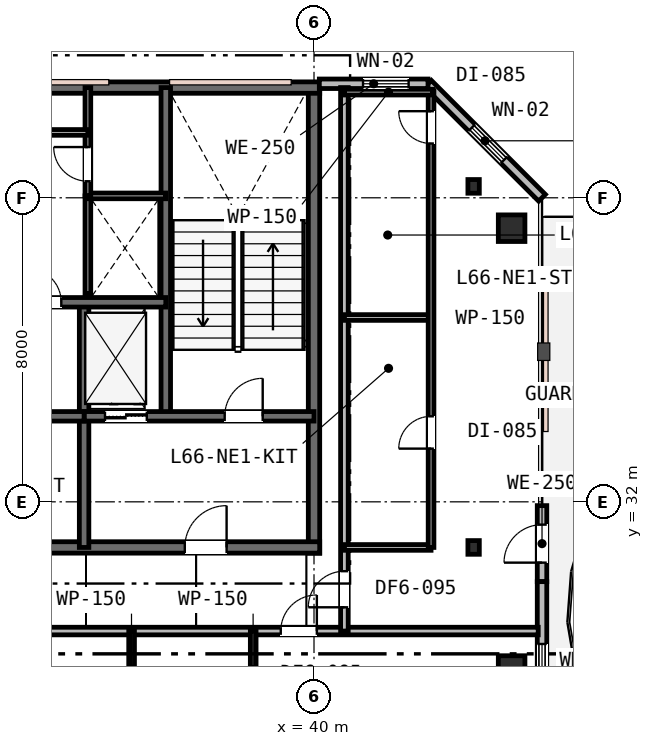
"""IFC4 building model, lengths in metres.
Left out: names, types, materials, properties, quantities, classifications, styles, units other than length and angle.
Written with IfcOpenShell. Run it as: python <this file> out.ifc"""

import sys

from ifc_helpers import new_model, si_unit, direction, frame, frame_2d, origin, origin_2d, place, context, subcontext, project, spatial, rectangle, i_section, extrude, element, fill, save


model = new_model("IFC4")
c1 = context("Model", 3, precision=1e-05, world=origin(), true_north=direction((0.0, 1.0)))
c2 = subcontext(c1, "Body", "Model", "MODEL_VIEW")
j1 = project(units=[si_unit("LENGTHUNIT", "METRE"), si_unit("PLANEANGLEUNIT", "RADIAN")], contexts=[c1])
p1 = place(None, origin())
s1 = spatial("IfcSite", under=j1, at=p1, CompositionType="ELEMENT")
p2 = place(p1, origin())
s2 = spatial("IfcBuilding", under=s1, at=p2, CompositionType="ELEMENT")
p3 = place(p2, frame((0.0, 0.0, 256.4)))
s3 = spatial("IfcBuildingStorey", under=s2, at=p3, CompositionType="ELEMENT", Elevation=256.4)
p4 = place(p3, frame((40.0, 30.65, 0.0), z_axis=(0.0, 0.0, 1.0), x_axis=(0.0, 1.0, 0.0)))
e1 = element("IfcWall", 1, at=p4, inside=s3, PredefinedType="SHEAR", context=c2, shape_type="SweptSolid", body=[
    extrude(rectangle(XDim=12.3, YDim=0.3, at=frame_2d((6.15, 0.0))), origin(), (0.0, 0.0, 1.0), 3.8),
])
p5 = place(p3, frame((15.85, 42.9, 0.0), z_axis=(0.0, 0.0, 1.0), x_axis=(1.0, 0.0, 0.0)))
e2 = element("IfcWall", 2, at=p5, inside=s3, PredefinedType="SHEAR", context=c2, shape_type="SweptSolid", body=[
    extrude(rectangle(XDim=24.3, YDim=0.3, at=frame_2d((12.15, 0.0))), origin(), (0.0, 0.0, 1.0), 3.8),
])
p6 = place(p3, frame((28.95, 30.8, 0.0), z_axis=(0.0, 0.0, 1.0), x_axis=(1.0, 0.0, 0.0)))
e3 = element("IfcWall", 3, at=p6, inside=s3, PredefinedType="SHEAR", context=c2, shape_type="SweptSolid", body=[
    extrude(rectangle(XDim=11.2, YDim=0.3, at=frame_2d((5.6, 0.0))), origin(), (0.0, 0.0, 1.0), 3.8),
])
p7 = place(p6, frame((7.65, 0.0, 0.0)))
e4 = element("IfcOpeningElement", 4, at=p7, cuts=e3, PredefinedType="OPENING", context=c2, shape_type="SweptSolid", body=[
    extrude(rectangle(XDim=1.1, YDim=2.15, at=frame_2d((0.55, 1.075))), frame((0.0, 0.16, 0.0), z_axis=(0.0, -1.0, 0.0), x_axis=(1.0, 0.0, 0.0)), (0.0, 0.0, 1.0), 0.32),
])
p8 = place(p3, frame((36.1, 34.25, 0.0), z_axis=(0.0, 0.0, 1.0), x_axis=(0.0, 1.0, 0.0)))
e5 = element("IfcWall", 5, at=p8, inside=s3, PredefinedType="SHEAR", context=c2, shape_type="SweptSolid", body=[
    extrude(rectangle(XDim=8.65, YDim=0.25, at=frame_2d((4.325, 0.0))), origin(), (0.0, 0.0, 1.0), 3.8),
])
p9 = place(p3, frame((33.95, 30.8, 0.0), z_axis=(0.0, 0.0, 1.0), x_axis=(0.0, 1.0, 0.0)))
e6 = element("IfcWall", 6, at=p9, inside=s3, PredefinedType="SHEAR", context=c2, shape_type="SweptSolid", body=[
    extrude(rectangle(XDim=6.45, YDim=0.25, at=frame_2d((3.225, 0.0))), origin(), (0.0, 0.0, 1.0), 3.8),
])
p10 = place(p3, frame((33.95, 34.25, 0.0), z_axis=(0.0, 0.0, 1.0), x_axis=(1.0, 0.0, 0.0)))
e7 = element("IfcWall", 7, at=p10, inside=s3, PredefinedType="SHEAR", context=c2, shape_type="SweptSolid", body=[
    extrude(rectangle(XDim=6.05, YDim=0.25, at=frame_2d((3.025, 0.0))), origin(), (0.0, 0.0, 1.0), 3.8),
])
p11 = place(p10, frame((3.7, 0.0, 0.0)))
e8 = element("IfcOpeningElement", 8, at=p11, cuts=e7, PredefinedType="OPENING", context=c2, shape_type="SweptSolid", body=[
    extrude(rectangle(XDim=1.0, YDim=2.15, at=frame_2d((0.5, 1.075))), frame((0.0, 0.135, 0.0), z_axis=(0.0, -1.0, 0.0), x_axis=(1.0, 0.0, 0.0)), (0.0, 0.0, 1.0), 0.27),
])
p12 = place(p10, frame((0.55, 0.0, 0.0)))
e9 = element("IfcOpeningElement", 9, at=p12, cuts=e7, PredefinedType="OPENING", context=c2, shape_type="SweptSolid", body=[
    extrude(rectangle(XDim=1.1, YDim=2.15, at=frame_2d((0.55, 1.075))), frame((0.0, 0.135, 0.0), z_axis=(0.0, -1.0, 0.0), x_axis=(1.0, 0.0, 0.0)), (0.0, 0.0, 1.0), 0.27),
])
p13 = place(p3, frame((28.95, 34.25, 0.0), z_axis=(0.0, 0.0, 1.0), x_axis=(1.0, 0.0, 0.0)))
e10 = element("IfcWall", 10, at=p13, inside=s3, PredefinedType="SHEAR", context=c2, shape_type="SweptSolid", body=[
    extrude(rectangle(XDim=5.0, YDim=0.25, at=frame_2d((2.5, 0.0))), origin(), (0.0, 0.0, 1.0), 3.8),
])
p14 = place(p13, frame((1.95, 0.0, 0.0)))
e11 = element("IfcOpeningElement", 11, at=p14, cuts=e10, PredefinedType="OPENING", context=c2, shape_type="SweptSolid", body=[
    extrude(rectangle(XDim=1.0, YDim=2.15, at=frame_2d((0.5, 1.075))), frame((0.0, 0.135, 0.0), z_axis=(0.0, -1.0, 0.0), x_axis=(1.0, 0.0, 0.0)), (0.0, 0.0, 1.0), 0.27),
])
p15 = place(p3, frame((19.9, 37.25, 0.0), z_axis=(0.0, 0.0, 1.0), x_axis=(1.0, 0.0, 0.0)))
e12 = element("IfcWall", 12, at=p15, inside=s3, PredefinedType="SHEAR", context=c2, shape_type="SweptSolid", body=[
    extrude(rectangle(XDim=16.2, YDim=0.25, at=frame_2d((8.1, 0.0))), origin(), (0.0, 0.0, 1.0), 3.8),
])
p16 = place(p15, frame((12.55, 0.0, 0.0)))
e13 = element("IfcOpeningElement", 13, at=p16, cuts=e12, PredefinedType="OPENING", context=c2, shape_type="SweptSolid", body=[
    extrude(rectangle(XDim=0.9, YDim=2.15, at=frame_2d((0.45, 1.075))), frame((0.0, 0.135, 0.0), z_axis=(0.0, -1.0, 0.0), x_axis=(1.0, 0.0, 0.0)), (0.0, 0.0, 1.0), 0.27),
])
p17 = place(p15, frame((2.5, 0.0, 0.0)))
e14 = element("IfcOpeningElement", 14, at=p17, cuts=e12, PredefinedType="OPENING", context=c2, shape_type="SweptSolid", body=[
    extrude(rectangle(XDim=1.05, YDim=2.15, at=frame_2d((0.525, 1.075))), frame((0.0, 0.135, 0.0), z_axis=(0.0, -1.0, 0.0), x_axis=(1.0, 0.0, 0.0)), (0.0, 0.0, 1.0), 0.27),
])
p18 = place(p15, frame((4.4, 0.0, 0.0)))
e15 = element("IfcOpeningElement", 15, at=p18, cuts=e12, PredefinedType="OPENING", context=c2, shape_type="SweptSolid", body=[
    extrude(rectangle(XDim=1.05, YDim=2.15, at=frame_2d((0.525, 1.075))), frame((0.0, 0.135, 0.0), z_axis=(0.0, -1.0, 0.0), x_axis=(1.0, 0.0, 0.0)), (0.0, 0.0, 1.0), 0.27),
])
p19 = place(p15, frame((6.3, 0.0, 0.0)))
e16 = element("IfcOpeningElement", 16, at=p19, cuts=e12, PredefinedType="OPENING", context=c2, shape_type="SweptSolid", body=[
    extrude(rectangle(XDim=1.05, YDim=2.15, at=frame_2d((0.525, 1.075))), frame((0.0, 0.135, 0.0), z_axis=(0.0, -1.0, 0.0), x_axis=(1.0, 0.0, 0.0)), (0.0, 0.0, 1.0), 0.27),
])
for number, where, z_axis, x_axis in (
    (17, (45.2, 27.6, 0.0), (0.0, 0.0, 1.0), (1.0, 0.0, 0.0)),
    (18, (45.2, 39.2, 0.0), (0.0, 0.0, 1.0), (1.0, 0.0, 0.0)),
):
    element("IfcColumn", number, at=place(p3, frame(where, z_axis=z_axis, x_axis=x_axis)), inside=s3, PredefinedType="COLUMN", context=c2, shape_type="SweptSolid", body=[
        extrude(rectangle(XDim=0.7, YDim=0.7, at=origin_2d()), origin(), (0.0, 0.0, 1.0), 3.8),
    ])
for number, where, z_axis, x_axis in (
    (19, (44.2, 30.8, 0.0), (0.0, 0.0, 1.0), (1.0, 0.0, 0.0)),
    (20, (44.2, 40.3, 0.0), (0.0, 0.0, 1.0), (1.0, 0.0, 0.0)),
):
    element("IfcColumn", number, at=place(p3, frame(where, z_axis=z_axis, x_axis=x_axis)), inside=s3, PredefinedType="COLUMN", context=c2, shape_type="SweptSolid", body=[
        extrude(i_section(OverallWidth=0.3, OverallDepth=0.36, WebThickness=0.013, FlangeThickness=0.022, FilletRadius=0.027, at=origin_2d()), origin(), (0.0, 0.0, 1.0), 3.8),
    ])
p20 = place(p3, frame((46.0, 29.9, 0.0), z_axis=(0.0, 0.0, 1.0), x_axis=(0.0, 1.0, 0.0)))
e21 = element("IfcWall", 21, at=p20, inside=s3, PredefinedType="STANDARD", context=c2, shape_type="SweptSolid", body=[
    extrude(rectangle(XDim=2.0, YDim=0.25, at=frame_2d((1.0, 0.0))), origin(), (0.0, 0.0, 1.0), 3.53),
])
p21 = place(p20, frame((0.5, 0.0, 0.0)))
e22 = element("IfcOpeningElement", 22, at=p21, cuts=e21, PredefinedType="OPENING", context=c2, shape_type="SweptSolid", body=[
    extrude(rectangle(XDim=1.0, YDim=2.15, at=frame_2d((0.5, 1.075))), frame((0.0, 0.135, 0.0), z_axis=(0.0, -1.0, 0.0), x_axis=(1.0, 0.0, 0.0)), (0.0, 0.0, 1.0), 0.27),
])
p22 = place(p3, frame((46.0, 27.0, 0.0), z_axis=(0.0, 0.0, 1.0), x_axis=(0.0, 1.0, 0.0)))
e23 = element("IfcWall", 23, at=p22, inside=s3, PredefinedType="STANDARD", context=c2, shape_type="SweptSolid", body=[
    extrude(rectangle(XDim=2.9, YDim=0.25, at=frame_2d((1.45, 0.0))), origin(), (0.0, 0.0, 1.0), 3.53),
])
p23 = place(p22, frame((0.36, 0.0, 0.9)))
e24 = element("IfcOpeningElement", 24, at=p23, cuts=e23, PredefinedType="OPENING", context=c2, shape_type="SweptSolid", body=[
    extrude(rectangle(XDim=0.9, YDim=1.55, at=frame_2d((0.45, 0.775))), frame((0.0, 0.135, 0.0), z_axis=(0.0, -1.0, 0.0), x_axis=(1.0, 0.0, 0.0)), (0.0, 0.0, 1.0), 0.27),
])
p24 = place(p3, frame((46.0, 40.0, 0.0), z_axis=(0.0, 0.0, 1.0), x_axis=(-0.707106781187, 0.707106781187, 0.0)))
e25 = element("IfcWall", 25, at=p24, inside=s3, PredefinedType="STANDARD", context=c2, shape_type="SweptSolid", body=[
    extrude(rectangle(XDim=4.243, YDim=0.25, at=frame_2d((2.121, 0.0))), origin(), (0.0, 0.0, 1.0), 3.53),
])
p25 = place(p24, frame((1.411, 0.0, 0.85)))
e26 = element("IfcOpeningElement", 26, at=p25, cuts=e25, PredefinedType="OPENING", context=c2, shape_type="SweptSolid", body=[
    extrude(rectangle(XDim=1.2, YDim=1.6, at=frame_2d((0.6, 0.8))), frame((0.0, 0.135, 0.0), z_axis=(0.0, -1.0, 0.0), x_axis=(1.0, 0.0, 0.0)), (0.0, 0.0, 1.0), 0.27),
])
p26 = place(p3, frame((43.0, 43.0, 0.0), z_axis=(0.0, 0.0, 1.0), x_axis=(-1.0, 0.0, 0.0)))
e27 = element("IfcWall", 27, at=p26, inside=s3, PredefinedType="STANDARD", context=c2, shape_type="SweptSolid", body=[
    extrude(rectangle(XDim=2.86, YDim=0.25, at=frame_2d((1.43, 0.0))), origin(), (0.0, 0.0, 1.0), 3.53),
])
p27 = place(p26, frame((0.51, 0.0, 0.85)))
e28 = element("IfcOpeningElement", 28, at=p27, cuts=e27, PredefinedType="OPENING", context=c2, shape_type="SweptSolid", body=[
    extrude(rectangle(XDim=1.2, YDim=1.6, at=frame_2d((0.6, 0.8))), frame((0.0, 0.135, 0.0), z_axis=(0.0, -1.0, 0.0), x_axis=(1.0, 0.0, 0.0)), (0.0, 0.0, 1.0), 0.27),
])
p28 = place(p3, frame((34.05, 37.473, 0.0), z_axis=(0.0, 0.0, 1.0), x_axis=(0.0, 1.0, 0.0)))
e29 = element("IfcWall", 29, at=p28, inside=s3, PredefinedType="PLUMBINGWALL", context=c2, shape_type="SweptSolid", body=[
    extrude(rectangle(XDim=2.577, YDim=0.15, at=frame_2d((1.288, 0.0))), origin(), (0.0, 0.0, 1.0), 3.53),
])
p29 = place(p3, frame((34.05, 40.05, 0.0), z_axis=(0.0, 0.0, 1.0), x_axis=(1.0, 0.0, 0.0)))
e30 = element("IfcWall", 30, at=p29, inside=s3, PredefinedType="PARTITIONING", context=c2, shape_type="SweptSolid", body=[
    extrude(rectangle(XDim=2.05, YDim=0.15, at=frame_2d((1.025, 0.0))), origin(), (0.0, 0.0, 1.0), 3.53),
])
p30 = place(p3, frame((34.05, 40.05, 0.0), z_axis=(0.0, 0.0, 1.0), x_axis=(0.0, 1.0, 0.0)))
e31 = element("IfcWall", 31, at=p30, inside=s3, PredefinedType="PARTITIONING", context=c2, shape_type="SweptSolid", body=[
    extrude(rectangle(XDim=2.85, YDim=0.15, at=frame_2d((1.425, 0.0))), origin(), (0.0, 0.0, 1.0), 3.53),
])
p31 = place(p30, frame((0.385, 0.0, 0.0)))
e32 = element("IfcOpeningElement", 32, at=p31, cuts=e31, PredefinedType="OPENING", context=c2, shape_type="SweptSolid", body=[
    extrude(rectangle(XDim=0.9, YDim=2.15, at=frame_2d((0.45, 1.075))), frame((0.0, 0.085, 0.0), z_axis=(0.0, -1.0, 0.0), x_axis=(1.0, 0.0, 0.0)), (0.0, 0.0, 1.0), 0.17),
])
p32 = place(p3, frame((22.08, 41.72, 0.0), z_axis=(0.0, 0.0, 1.0), x_axis=(1.0, 0.0, 0.0)))
e33 = element("IfcWall", 33, at=p32, inside=s3, PredefinedType="PARTITIONING", context=c2, shape_type="SweptSolid", body=[
    extrude(rectangle(XDim=11.97, YDim=0.15, at=frame_2d((5.985, 0.0))), origin(), (0.0, 0.0, 1.0), 3.53),
])
p33 = place(p32, frame((5.535, 0.0, 0.0)))
e34 = element("IfcOpeningElement", 34, at=p33, cuts=e33, PredefinedType="OPENING", context=c2, shape_type="SweptSolid", body=[
    extrude(rectangle(XDim=0.9, YDim=2.15, at=frame_2d((0.45, 1.075))), frame((0.0, 0.085, 0.0), z_axis=(0.0, -1.0, 0.0), x_axis=(1.0, 0.0, 0.0)), (0.0, 0.0, 1.0), 0.17),
])
p34 = place(p3, frame((21.6, 28.6, 0.0), z_axis=(0.0, 0.0, 1.0), x_axis=(1.0, 0.0, 0.0)))
e35 = element("IfcWall", 35, at=p34, inside=s3, PredefinedType="PARTITIONING", context=c2, shape_type="SweptSolid", body=[
    extrude(rectangle(XDim=24.3, YDim=0.2, at=frame_2d((12.15, 0.0))), origin(), (0.0, 0.0, 1.0), 3.16),
])
p35 = place(p34, frame((5.925, 0.0, 0.0)))
e36 = element("IfcOpeningElement", 36, at=p35, cuts=e35, PredefinedType="OPENING", context=c2, shape_type="SweptSolid", body=[
    extrude(rectangle(XDim=0.95, YDim=2.15, at=frame_2d((0.475, 1.075))), frame((0.0, 0.11, 0.0), z_axis=(0.0, -1.0, 0.0), x_axis=(1.0, 0.0, 0.0)), (0.0, 0.0, 1.0), 0.22),
])
p36 = place(p34, frame((17.525, 0.0, 0.0)))
e37 = element("IfcOpeningElement", 37, at=p36, cuts=e35, PredefinedType="OPENING", context=c2, shape_type="SweptSolid", body=[
    extrude(rectangle(XDim=0.95, YDim=2.15, at=frame_2d((0.475, 1.075))), frame((0.0, 0.11, 0.0), z_axis=(0.0, -1.0, 0.0), x_axis=(1.0, 0.0, 0.0)), (0.0, 0.0, 1.0), 0.22),
])
p37 = place(p3, frame((40.8, 28.6, 0.0), z_axis=(0.0, 0.0, 1.0), x_axis=(0.0, 1.0, 0.0)))
e38 = element("IfcWall", 38, at=p37, inside=s3, PredefinedType="PARTITIONING", context=c2, shape_type="SweptSolid", body=[
    extrude(rectangle(XDim=14.3, YDim=0.2, at=frame_2d((7.15, 0.0))), origin(), (0.0, 0.0, 1.0), 3.16),
])
p38 = place(p37, frame((0.625, 0.0, 0.0)))
e39 = element("IfcOpeningElement", 39, at=p38, cuts=e38, PredefinedType="OPENING", context=c2, shape_type="SweptSolid", body=[
    extrude(rectangle(XDim=0.95, YDim=2.15, at=frame_2d((0.475, 1.075))), frame((0.0, 0.11, 0.0), z_axis=(0.0, -1.0, 0.0), x_axis=(1.0, 0.0, 0.0)), (0.0, 0.0, 1.0), 0.22),
])
p39 = place(p3, frame((40.8, 30.8, 0.0), z_axis=(0.0, 0.0, 1.0), x_axis=(1.0, 0.0, 0.0)))
e40 = element("IfcWall", 40, at=p39, inside=s3, PredefinedType="PARTITIONING", context=c2, shape_type="SweptSolid", body=[
    extrude(rectangle(XDim=2.28, YDim=0.15, at=frame_2d((1.14, 0.0))), origin(), (0.0, 0.0, 1.0), 3.16),
])
p40 = place(p3, frame((40.8, 36.85, 0.0), z_axis=(0.0, 0.0, 1.0), x_axis=(1.0, 0.0, 0.0)))
e41 = element("IfcWall", 41, at=p40, inside=s3, PredefinedType="PARTITIONING", context=c2, shape_type="SweptSolid", body=[
    extrude(rectangle(XDim=2.28, YDim=0.15, at=frame_2d((1.14, 0.0))), origin(), (0.0, 0.0, 1.0), 3.53),
])
p41 = place(p3, frame((43.08, 30.8, 0.0), z_axis=(0.0, 0.0, 1.0), x_axis=(0.0, 1.0, 0.0)))
e42 = element("IfcWall", 42, at=p41, inside=s3, PredefinedType="PARTITIONING", context=c2, shape_type="SweptSolid", body=[
    extrude(rectangle(XDim=12.02, YDim=0.15, at=frame_2d((6.01, 0.0))), origin(), (0.0, 0.0, 1.0), 3.16),
])
p42 = place(p41, frame((2.6, 0.0, 0.0)))
e43 = element("IfcOpeningElement", 43, at=p42, cuts=e42, PredefinedType="OPENING", context=c2, shape_type="SweptSolid", body=[
    extrude(rectangle(XDim=0.85, YDim=2.15, at=frame_2d((0.425, 1.075))), frame((0.0, 0.085, 0.0), z_axis=(0.0, -1.0, 0.0), x_axis=(1.0, 0.0, 0.0)), (0.0, 0.0, 1.0), 0.17),
])
p43 = place(p41, frame((10.629, 0.0, 0.0)))
e44 = element("IfcOpeningElement", 44, at=p43, cuts=e42, PredefinedType="OPENING", context=c2, shape_type="SweptSolid", body=[
    extrude(rectangle(XDim=0.85, YDim=2.15, at=frame_2d((0.425, 1.075))), frame((0.0, 0.085, 0.0), z_axis=(0.0, -1.0, 0.0), x_axis=(1.0, 0.0, 0.0)), (0.0, 0.0, 1.0), 0.17),
])
p44 = place(p3, frame((40.8, 42.78, 0.0), z_axis=(0.0, 0.0, 1.0), x_axis=(1.0, 0.0, 0.0)))
e45 = element("IfcWall", 45, at=p44, inside=s3, PredefinedType="PARTITIONING", context=c2, shape_type="SweptSolid", body=[
    extrude(rectangle(XDim=2.32, YDim=0.15, at=frame_2d((1.16, 0.0))), origin(), (0.0, 0.0, 1.0), 3.53),
])
for number, where, z_axis, x_axis in (
    (46, (38.4, 26.576, 0.0), (0.0, 0.0, 1.0), (0.0, 1.0, 0.0)),
    (47, (35.2, 26.576, 0.0), (0.0, 0.0, 1.0), (0.0, 1.0, 0.0)),
):
    element("IfcWall", number, at=place(p3, frame(where, z_axis=z_axis, x_axis=x_axis)), inside=s3, PredefinedType="PARTITIONING", context=c2, shape_type="SweptSolid", body=[
        extrude(rectangle(XDim=2.024, YDim=0.15, at=frame_2d((1.012, 0.0))), origin(), (0.0, 0.0, 1.0), 3.53),
    ])
p45 = place(p21, origin())
e48 = element("IfcDoor", 48, at=p45, inside=s3, OperationType="SINGLE_SWING_LEFT", PredefinedType="DOOR", context=c2, shape_type="SweptSolid", body=[
    extrude(rectangle(XDim=1.0, YDim=2.15, at=frame_2d((0.5, 1.075))), frame((0.0, 0.025, 0.0), z_axis=(0.0, -1.0, 0.0), x_axis=(1.0, 0.0, 0.0)), (0.0, 0.0, 1.0), 0.05),
])
fill(e22, e48)
p46 = place(p23, origin())
e49 = element("IfcWindow", 49, at=p46, inside=s3, PartitioningType="SINGLE_PANEL", PredefinedType="WINDOW", context=c2, shape_type="SweptSolid", body=[
    extrude(rectangle(XDim=0.9, YDim=1.55, at=frame_2d((0.45, 0.775))), frame((0.0, 0.03, 0.0), z_axis=(0.0, -1.0, 0.0), x_axis=(1.0, 0.0, 0.0)), (0.0, 0.0, 1.0), 0.06),
])
fill(e24, e49)
p47 = place(p25, origin())
e50 = element("IfcWindow", 50, at=p47, inside=s3, PartitioningType="SINGLE_PANEL", PredefinedType="WINDOW", context=c2, shape_type="SweptSolid", body=[
    extrude(rectangle(XDim=1.2, YDim=1.6, at=frame_2d((0.6, 0.8))), frame((0.0, 0.03, 0.0), z_axis=(0.0, -1.0, 0.0), x_axis=(1.0, 0.0, 0.0)), (0.0, 0.0, 1.0), 0.06),
])
fill(e26, e50)
p48 = place(p27, origin())
e51 = element("IfcWindow", 51, at=p48, inside=s3, PartitioningType="SINGLE_PANEL", PredefinedType="WINDOW", context=c2, shape_type="SweptSolid", body=[
    extrude(rectangle(XDim=1.2, YDim=1.6, at=frame_2d((0.6, 0.8))), frame((0.0, 0.03, 0.0), z_axis=(0.0, -1.0, 0.0), x_axis=(1.0, 0.0, 0.0)), (0.0, 0.0, 1.0), 0.06),
])
fill(e28, e51)
p49 = place(p11, origin())
e52 = element("IfcDoor", 52, at=p49, inside=s3, OperationType="SINGLE_SWING_RIGHT", PredefinedType="DOOR", context=c2, shape_type="SweptSolid", body=[
    extrude(rectangle(XDim=1.0, YDim=2.15, at=frame_2d((0.5, 1.075))), frame((0.0, 0.025, 0.0), z_axis=(0.0, -1.0, 0.0), x_axis=(1.0, 0.0, 0.0)), (0.0, 0.0, 1.0), 0.05),
])
fill(e8, e52)
p50 = place(p7, origin())
e53 = element("IfcDoor", 53, at=p50, inside=s3, OperationType="SINGLE_SWING_RIGHT", PredefinedType="DOOR", context=c2, shape_type="SweptSolid", body=[
    extrude(rectangle(XDim=1.1, YDim=2.15, at=frame_2d((0.55, 1.075))), frame((0.0, 0.025, 0.0), z_axis=(0.0, -1.0, 0.0), x_axis=(1.0, 0.0, 0.0)), (0.0, 0.0, 1.0), 0.05),
])
fill(e4, e53)
p51 = place(p16, origin())
e54 = element("IfcDoor", 54, at=p51, inside=s3, OperationType="SINGLE_SWING_LEFT", PredefinedType="DOOR", context=c2, shape_type="SweptSolid", body=[
    extrude(rectangle(XDim=0.9, YDim=2.15, at=frame_2d((0.45, 1.075))), frame((0.0, 0.025, 0.0), z_axis=(0.0, -1.0, 0.0), x_axis=(1.0, 0.0, 0.0)), (0.0, 0.0, 1.0), 0.05),
])
fill(e13, e54)
p52 = place(p31, origin())
e55 = element("IfcDoor", 55, at=p52, inside=s3, OperationType="SINGLE_SWING_RIGHT", PredefinedType="DOOR", context=c2, shape_type="SweptSolid", body=[
    extrude(rectangle(XDim=0.9, YDim=2.15, at=frame_2d((0.45, 1.075))), frame((0.0, 0.025, 0.0), z_axis=(0.0, -1.0, 0.0), x_axis=(1.0, 0.0, 0.0)), (0.0, 0.0, 1.0), 0.05),
])
fill(e32, e55)
p53 = place(p38, origin())
e56 = element("IfcDoor", 56, at=p53, inside=s3, OperationType="SINGLE_SWING_LEFT", PredefinedType="DOOR", context=c2, shape_type="SweptSolid", body=[
    extrude(rectangle(XDim=0.95, YDim=2.15, at=frame_2d((0.475, 1.075))), frame((0.0, 0.025, 0.0), z_axis=(0.0, -1.0, 0.0), x_axis=(1.0, 0.0, 0.0)), (0.0, 0.0, 1.0), 0.05),
])
fill(e39, e56)
p54 = place(p42, origin())
e57 = element("IfcDoor", 57, at=p54, inside=s3, OperationType="SINGLE_SWING_LEFT", PredefinedType="DOOR", context=c2, shape_type="SweptSolid", body=[
    extrude(rectangle(XDim=0.85, YDim=2.15, at=frame_2d((0.425, 1.075))), frame((0.0, 0.025, 0.0), z_axis=(0.0, -1.0, 0.0), x_axis=(1.0, 0.0, 0.0)), (0.0, 0.0, 1.0), 0.05),
])
fill(e43, e57)
p55 = place(p43, origin())
e58 = element("IfcDoor", 58, at=p55, inside=s3, OperationType="SINGLE_SWING_RIGHT", PredefinedType="DOOR", context=c2, shape_type="SweptSolid", body=[
    extrude(rectangle(XDim=0.85, YDim=2.15, at=frame_2d((0.425, 1.075))), frame((0.0, 0.025, 0.0), z_axis=(0.0, -1.0, 0.0), x_axis=(1.0, 0.0, 0.0)), (0.0, 0.0, 1.0), 0.05),
])
fill(e44, e58)
p56 = place(p36, origin())
e59 = element("IfcDoor", 59, at=p56, inside=s3, OperationType="SINGLE_SWING_RIGHT", PredefinedType="DOOR", context=c2, shape_type="SweptSolid", body=[
    extrude(rectangle(XDim=0.95, YDim=2.15, at=frame_2d((0.475, 1.075))), frame((0.0, 0.025, 0.0), z_axis=(0.0, -1.0, 0.0), x_axis=(1.0, 0.0, 0.0)), (0.0, 0.0, 1.0), 0.05),
])
fill(e37, e59)
p57 = place(p12, origin())
e60 = element("IfcDoor", 60, at=p57, inside=s3, OperationType="DOUBLE_DOOR_SLIDING", PredefinedType="DOOR", context=c2, shape_type="SweptSolid", body=[
    extrude(rectangle(XDim=1.1, YDim=2.15, at=frame_2d((0.55, 1.075))), frame((0.0, 0.025, 0.0), z_axis=(0.0, -1.0, 0.0), x_axis=(1.0, 0.0, 0.0)), (0.0, 0.0, 1.0), 0.05),
])
fill(e9, e60)
save(model, sys.argv[1])
